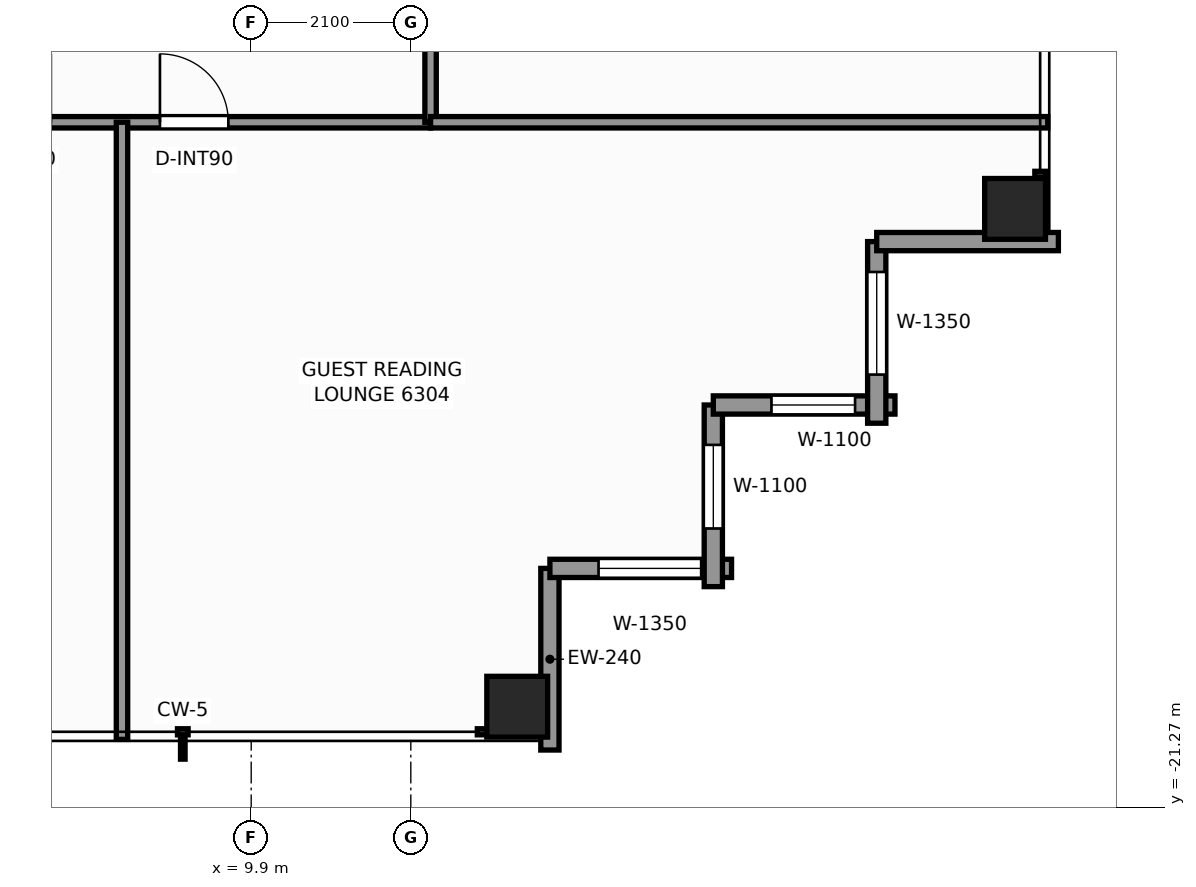
"""IFC4 building model, lengths in metres.
Left out: names, types, materials, properties, quantities, classifications, styles, units other than length and angle.
Written with IfcOpenShell. Run it as: python <this file> out.ifc"""

import sys

from ifc_helpers import new_model, si_unit, direction, frame, frame_2d, origin, origin_2d, place, context, subcontext, project, spatial, rectangle, extrude, element, fill, save


model = new_model("IFC4")
c1 = context("Model", 3, precision=1e-05, world=origin(), true_north=direction((0.0, 1.0)))
c2 = subcontext(c1, "Body", "Model", "MODEL_VIEW")
j1 = project(units=[si_unit("LENGTHUNIT", "METRE"), si_unit("PLANEANGLEUNIT", "RADIAN")], contexts=[c1])
p1 = place(None, origin())
s1 = spatial("IfcSite", under=j1, at=p1, CompositionType="ELEMENT")
p2 = place(p1, origin())
s2 = spatial("IfcBuilding", under=s1, at=p2, CompositionType="ELEMENT")
p3 = place(p2, frame((0.0, 0.0, 216.3)))
s3 = spatial("IfcBuildingStorey", under=s2, at=p3, CompositionType="ELEMENT", Elevation=216.3)
for number, where, z_axis, x_axis in (
    (1, (13.4, -19.95, 0.0), (0.0, 0.0, 1.0), (1.0, 0.0, 0.0)),
    (2, (19.95, -13.4, 0.0), (0.0, 0.0, 1.0), (1.0, 0.0, 0.0)),
):
    element("IfcColumn", number, at=place(p3, frame(where, z_axis=z_axis, x_axis=x_axis)), inside=s3, PredefinedType="COLUMN", context=c2, shape_type="SweptSolid", body=[
        extrude(rectangle(XDim=0.8, YDim=0.8, at=origin_2d()), origin(), (0.0, 0.0, 1.0), 3.3),
    ])
p4 = place(p3, frame((13.83, -18.13, 0.0), z_axis=(0.0, 0.0, 1.0), x_axis=(0.0, -1.0, 0.0)))
e3 = element("IfcWall", 3, at=p4, inside=s3, PredefinedType="STANDARD", context=c2, shape_type="SweptSolid", body=[
    extrude(rectangle(XDim=2.39, YDim=0.24, at=frame_2d((1.195, 0.0))), origin(), (0.0, 0.0, 1.0), 2.463),
])
p5 = place(p3, frame((16.22, -18.13, 0.0), z_axis=(0.0, 0.0, 1.0), x_axis=(-1.0, 0.0, 0.0)))
e4 = element("IfcWall", 4, at=p5, inside=s3, PredefinedType="STANDARD", context=c2, shape_type="SweptSolid", body=[
    extrude(rectangle(XDim=2.39, YDim=0.24, at=frame_2d((1.195, 0.0))), origin(), (0.0, 0.0, 1.0), 2.463),
])
p6 = place(p5, frame((0.4, 0.0, 0.65)))
e5 = element("IfcOpeningElement", 5, at=p6, cuts=e4, PredefinedType="OPENING", context=c2, shape_type="SweptSolid", body=[
    extrude(rectangle(XDim=1.35, YDim=1.55, at=frame_2d((0.675, 0.775))), frame((0.0, 0.13, 0.0), z_axis=(0.0, -1.0, 0.0), x_axis=(1.0, 0.0, 0.0)), (0.0, 0.0, 1.0), 0.26),
])
p7 = place(p3, frame((15.98, -15.98, 0.0), z_axis=(0.0, 0.0, 1.0), x_axis=(0.0, -1.0, 0.0)))
e6 = element("IfcWall", 6, at=p7, inside=s3, PredefinedType="STANDARD", context=c2, shape_type="SweptSolid", body=[
    extrude(rectangle(XDim=2.39, YDim=0.24, at=frame_2d((1.195, 0.0))), origin(), (0.0, 0.0, 1.0), 2.463),
])
p8 = place(p7, frame((0.525, 0.0, 0.65)))
e7 = element("IfcOpeningElement", 7, at=p8, cuts=e6, PredefinedType="OPENING", context=c2, shape_type="SweptSolid", body=[
    extrude(rectangle(XDim=1.1, YDim=1.45, at=frame_2d((0.55, 0.725))), frame((0.0, 0.13, 0.0), z_axis=(0.0, -1.0, 0.0), x_axis=(1.0, 0.0, 0.0)), (0.0, 0.0, 1.0), 0.26),
])
p9 = place(p3, frame((18.37, -15.98, 0.0), z_axis=(0.0, 0.0, 1.0), x_axis=(-1.0, 0.0, 0.0)))
e8 = element("IfcWall", 8, at=p9, inside=s3, PredefinedType="STANDARD", context=c2, shape_type="SweptSolid", body=[
    extrude(rectangle(XDim=2.39, YDim=0.24, at=frame_2d((1.195, 0.0))), origin(), (0.0, 0.0, 1.0), 2.463),
])
p10 = place(p9, frame((0.525, 0.0, 0.65)))
e9 = element("IfcOpeningElement", 9, at=p10, cuts=e8, PredefinedType="OPENING", context=c2, shape_type="SweptSolid", body=[
    extrude(rectangle(XDim=1.1, YDim=1.45, at=frame_2d((0.55, 0.725))), frame((0.0, 0.13, 0.0), z_axis=(0.0, -1.0, 0.0), x_axis=(1.0, 0.0, 0.0)), (0.0, 0.0, 1.0), 0.26),
])
p11 = place(p3, frame((18.13, -13.83, 0.0), z_axis=(0.0, 0.0, 1.0), x_axis=(0.0, -1.0, 0.0)))
e10 = element("IfcWall", 10, at=p11, inside=s3, PredefinedType="STANDARD", context=c2, shape_type="SweptSolid", body=[
    extrude(rectangle(XDim=2.39, YDim=0.24, at=frame_2d((1.195, 0.0))), origin(), (0.0, 0.0, 1.0), 2.463),
])
p12 = place(p11, frame((0.4, 0.0, 0.65)))
e11 = element("IfcOpeningElement", 11, at=p12, cuts=e10, PredefinedType="OPENING", context=c2, shape_type="SweptSolid", body=[
    extrude(rectangle(XDim=1.35, YDim=1.55, at=frame_2d((0.675, 0.775))), frame((0.0, 0.13, 0.0), z_axis=(0.0, -1.0, 0.0), x_axis=(1.0, 0.0, 0.0)), (0.0, 0.0, 1.0), 0.26),
])
p13 = place(p3, frame((20.52, -13.83, 0.0), z_axis=(0.0, 0.0, 1.0), x_axis=(-1.0, 0.0, 0.0)))
e12 = element("IfcWall", 12, at=p13, inside=s3, PredefinedType="STANDARD", context=c2, shape_type="SweptSolid", body=[
    extrude(rectangle(XDim=2.39, YDim=0.24, at=frame_2d((1.195, 0.0))), origin(), (0.0, 0.0, 1.0), 2.463),
])
p14 = place(p3, frame((-12.26, -12.26, 0.0), z_axis=(0.0, 0.0, 1.0), x_axis=(1.0, 0.0, 0.0)))
e13 = element("IfcWall", 13, at=p14, inside=s3, PredefinedType="PARTITIONING", context=c2, shape_type="SweptSolid", body=[
    extrude(rectangle(XDim=24.52, YDim=0.15, at=frame_2d((12.26, 0.0))), origin(), (0.0, 0.0, 1.0), 2.369),
])
p15 = place(p14, frame((3.427, 0.0, 0.0)))
e14 = element("IfcOpeningElement", 14, at=p15, cuts=e13, PredefinedType="OPENING", context=c2, shape_type="SweptSolid", body=[
    extrude(rectangle(XDim=0.9, YDim=2.06, at=frame_2d((0.45, 1.03))), frame((0.0, 0.085, 0.0), z_axis=(0.0, -1.0, 0.0), x_axis=(1.0, 0.0, 0.0)), (0.0, 0.0, 1.0), 0.17),
])
p16 = place(p14, frame((5.762, 0.0, 0.0)))
e15 = element("IfcOpeningElement", 15, at=p16, cuts=e13, PredefinedType="OPENING", context=c2, shape_type="SweptSolid", body=[
    extrude(rectangle(XDim=0.9, YDim=2.06, at=frame_2d((0.45, 1.03))), frame((0.0, 0.085, 0.0), z_axis=(0.0, -1.0, 0.0), x_axis=(1.0, 0.0, 0.0)), (0.0, 0.0, 1.0), 0.17),
])
p17 = place(p14, frame((9.473, 0.0, 0.0)))
e16 = element("IfcOpeningElement", 16, at=p17, cuts=e13, PredefinedType="OPENING", context=c2, shape_type="SweptSolid", body=[
    extrude(rectangle(XDim=0.9, YDim=2.06, at=frame_2d((0.45, 1.03))), frame((0.0, 0.085, 0.0), z_axis=(0.0, -1.0, 0.0), x_axis=(1.0, 0.0, 0.0)), (0.0, 0.0, 1.0), 0.17),
])
p18 = place(p14, frame((12.875, 0.0, 0.0)))
e17 = element("IfcOpeningElement", 17, at=p18, cuts=e13, PredefinedType="OPENING", context=c2, shape_type="SweptSolid", body=[
    extrude(rectangle(XDim=0.95, YDim=2.06, at=frame_2d((0.475, 1.03))), frame((0.0, 0.085, 0.0), z_axis=(0.0, -1.0, 0.0), x_axis=(1.0, 0.0, 0.0)), (0.0, 0.0, 1.0), 0.17),
])
p19 = place(p14, frame((18.625, 0.0, 0.0)))
e18 = element("IfcOpeningElement", 18, at=p19, cuts=e13, PredefinedType="OPENING", context=c2, shape_type="SweptSolid", body=[
    extrude(rectangle(XDim=0.9, YDim=2.06, at=frame_2d((0.45, 1.03))), frame((0.0, 0.085, 0.0), z_axis=(0.0, -1.0, 0.0), x_axis=(1.0, 0.0, 0.0)), (0.0, 0.0, 1.0), 0.17),
])
p20 = place(p14, frame((20.959, 0.0, 0.0)))
e19 = element("IfcOpeningElement", 19, at=p20, cuts=e13, PredefinedType="OPENING", context=c2, shape_type="SweptSolid", body=[
    extrude(rectangle(XDim=0.9, YDim=2.06, at=frame_2d((0.45, 1.03))), frame((0.0, 0.085, 0.0), z_axis=(0.0, -1.0, 0.0), x_axis=(1.0, 0.0, 0.0)), (0.0, 0.0, 1.0), 0.17),
])
p21 = place(p3, frame((12.26, -12.26, 0.0), z_axis=(0.0, 0.0, 1.0), x_axis=(0.0, 1.0, 0.0)))
e20 = element("IfcWall", 20, at=p21, inside=s3, PredefinedType="PARTITIONING", context=c2, shape_type="SweptSolid", body=[
    extrude(rectangle(XDim=24.84, YDim=0.15, at=frame_2d((12.42, 0.0))), origin(), (0.0, 0.0, 1.0), 2.369),
])
p22 = place(p21, frame((2.686, 0.0, 0.0)))
e21 = element("IfcOpeningElement", 21, at=p22, cuts=e20, PredefinedType="OPENING", context=c2, shape_type="SweptSolid", body=[
    extrude(rectangle(XDim=0.9, YDim=2.06, at=frame_2d((0.45, 1.03))), frame((0.0, 0.085, 0.0), z_axis=(0.0, -1.0, 0.0), x_axis=(1.0, 0.0, 0.0)), (0.0, 0.0, 1.0), 0.17),
])
p23 = place(p21, frame((4.449, 0.0, 0.0)))
e22 = element("IfcOpeningElement", 22, at=p23, cuts=e20, PredefinedType="OPENING", context=c2, shape_type="SweptSolid", body=[
    extrude(rectangle(XDim=0.95, YDim=2.06, at=frame_2d((0.475, 1.03))), frame((0.0, 0.085, 0.0), z_axis=(0.0, -1.0, 0.0), x_axis=(1.0, 0.0, 0.0)), (0.0, 0.0, 1.0), 0.17),
])
p24 = place(p21, frame((13.361, 0.0, 0.0)))
e23 = element("IfcOpeningElement", 23, at=p24, cuts=e20, PredefinedType="OPENING", context=c2, shape_type="SweptSolid", body=[
    extrude(rectangle(XDim=0.95, YDim=2.06, at=frame_2d((0.475, 1.03))), frame((0.0, 0.085, 0.0), z_axis=(0.0, -1.0, 0.0), x_axis=(1.0, 0.0, 0.0)), (0.0, 0.0, 1.0), 0.17),
])
p25 = place(p21, frame((18.748, 0.0, 0.0)))
e24 = element("IfcOpeningElement", 24, at=p25, cuts=e20, PredefinedType="OPENING", context=c2, shape_type="SweptSolid", body=[
    extrude(rectangle(XDim=0.95, YDim=2.06, at=frame_2d((0.475, 1.03))), frame((0.0, 0.085, 0.0), z_axis=(0.0, -1.0, 0.0), x_axis=(1.0, 0.0, 0.0)), (0.0, 0.0, 1.0), 0.17),
])
p26 = place(p21, frame((20.836, 0.0, 0.0)))
e25 = element("IfcOpeningElement", 25, at=p26, cuts=e20, PredefinedType="OPENING", context=c2, shape_type="SweptSolid", body=[
    extrude(rectangle(XDim=0.9, YDim=2.06, at=frame_2d((0.45, 1.03))), frame((0.0, 0.085, 0.0), z_axis=(0.0, -1.0, 0.0), x_axis=(1.0, 0.0, 0.0)), (0.0, 0.0, 1.0), 0.17),
])
p27 = place(p3, frame((12.26, -12.26, 0.0), z_axis=(0.0, 0.0, 1.0), x_axis=(1.0, 0.0, 0.0)))
e26 = element("IfcWall", 26, at=p27, inside=s3, PredefinedType="PARTITIONING", context=c2, shape_type="SweptSolid", body=[
    extrude(rectangle(XDim=8.12, YDim=0.15, at=frame_2d((4.06, 0.0))), origin(), (0.0, 0.0, 1.0), 2.369),
])
p28 = place(p3, frame((8.2, -20.38, 0.0), z_axis=(0.0, 0.0, 1.0), x_axis=(0.0, 1.0, 0.0)))
e27 = element("IfcWall", 27, at=p28, inside=s3, PredefinedType="PARTITIONING", context=c2, shape_type="SweptSolid", body=[
    extrude(rectangle(XDim=8.12, YDim=0.15, at=frame_2d((4.06, 0.0))), origin(), (0.0, 0.0, 1.0), 2.453),
])
p29 = place(p6, origin())
e28 = element("IfcWindow", 28, at=p29, inside=s3, PartitioningType="SINGLE_PANEL", PredefinedType="WINDOW", context=c2, shape_type="SweptSolid", body=[
    extrude(rectangle(XDim=1.35, YDim=1.55, at=frame_2d((0.675, 0.775))), frame((0.0, 0.03, 0.0), z_axis=(0.0, -1.0, 0.0), x_axis=(1.0, 0.0, 0.0)), (0.0, 0.0, 1.0), 0.06),
])
fill(e5, e28)
p30 = place(p8, origin())
e29 = element("IfcWindow", 29, at=p30, inside=s3, PartitioningType="SINGLE_PANEL", PredefinedType="WINDOW", context=c2, shape_type="SweptSolid", body=[
    extrude(rectangle(XDim=1.1, YDim=1.45, at=frame_2d((0.55, 0.725))), frame((0.0, 0.03, 0.0), z_axis=(0.0, -1.0, 0.0), x_axis=(1.0, 0.0, 0.0)), (0.0, 0.0, 1.0), 0.06),
])
fill(e7, e29)
p31 = place(p10, origin())
e30 = element("IfcWindow", 30, at=p31, inside=s3, PartitioningType="SINGLE_PANEL", PredefinedType="WINDOW", context=c2, shape_type="SweptSolid", body=[
    extrude(rectangle(XDim=1.1, YDim=1.45, at=frame_2d((0.55, 0.725))), frame((0.0, 0.03, 0.0), z_axis=(0.0, -1.0, 0.0), x_axis=(1.0, 0.0, 0.0)), (0.0, 0.0, 1.0), 0.06),
])
fill(e9, e30)
p32 = place(p12, origin())
e31 = element("IfcWindow", 31, at=p32, inside=s3, PartitioningType="SINGLE_PANEL", PredefinedType="WINDOW", context=c2, shape_type="SweptSolid", body=[
    extrude(rectangle(XDim=1.35, YDim=1.55, at=frame_2d((0.675, 0.775))), frame((0.0, 0.03, 0.0), z_axis=(0.0, -1.0, 0.0), x_axis=(1.0, 0.0, 0.0)), (0.0, 0.0, 1.0), 0.06),
])
fill(e11, e31)
p33 = place(p20, origin())
e32 = element("IfcDoor", 32, at=p33, inside=s3, OperationType="SINGLE_SWING_LEFT", PredefinedType="DOOR", context=c2, shape_type="SweptSolid", body=[
    extrude(rectangle(XDim=0.9, YDim=2.06, at=frame_2d((0.45, 1.03))), frame((0.0, 0.025, 0.0), z_axis=(0.0, -1.0, 0.0), x_axis=(1.0, 0.0, 0.0)), (0.0, 0.0, 1.0), 0.05),
])
fill(e19, e32)
save(model, sys.argv[1])
